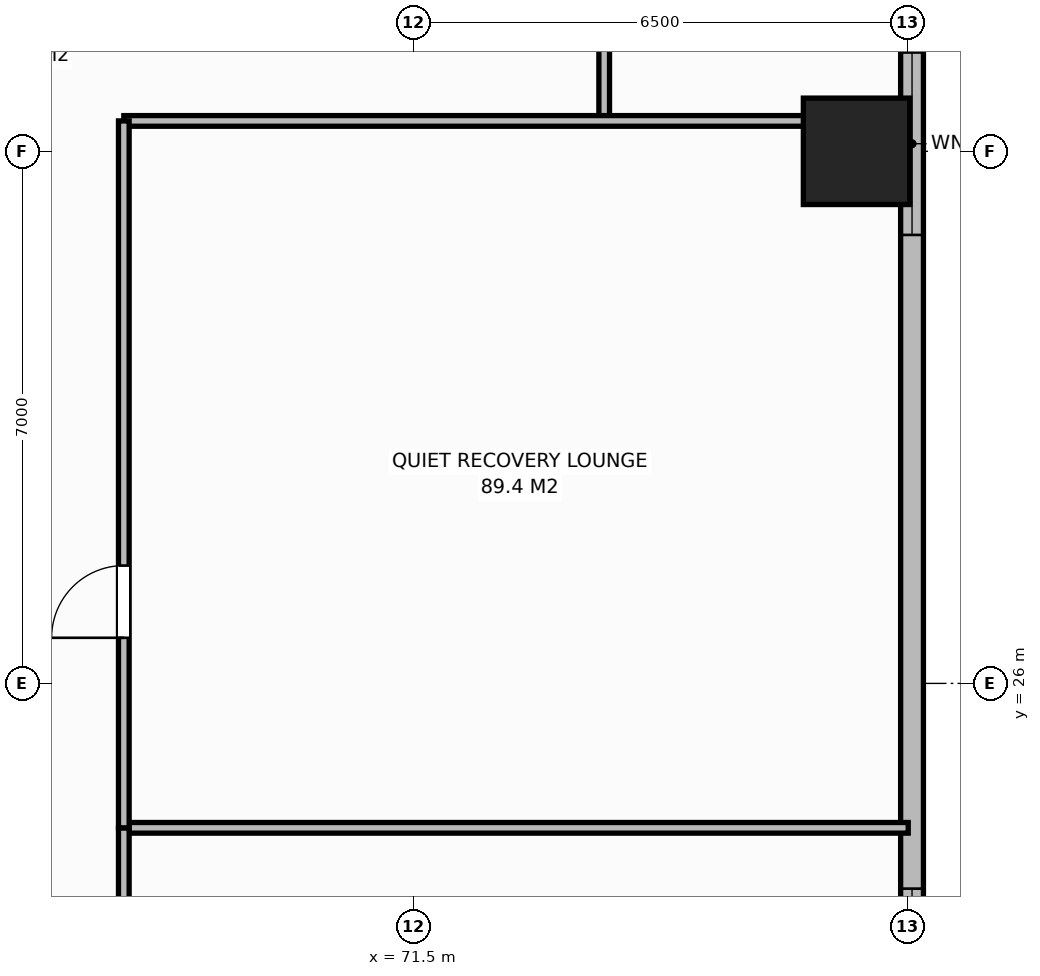
"""IFC4 building model, lengths in metres.
Left out: names, types, materials, properties, quantities, classifications, styles, units other than length and angle.
Written with IfcOpenShell. Run it as: python <this file> out.ifc"""

import sys

from ifc_helpers import new_model, si_unit, direction, frame, frame_2d, origin, origin_2d, place, context, subcontext, project, spatial, rectangle, extrude, element, fill, save


model = new_model("IFC4")
c1 = context("Model", 3, precision=1e-05, world=origin(), true_north=direction((0.0, 1.0)))
c2 = subcontext(c1, "Body", "Model", "MODEL_VIEW")
j1 = project(units=[si_unit("LENGTHUNIT", "METRE"), si_unit("PLANEANGLEUNIT", "RADIAN")], contexts=[c1])
p1 = place(None, origin())
s1 = spatial("IfcSite", under=j1, at=p1, CompositionType="ELEMENT")
p2 = place(p1, origin())
s2 = spatial("IfcBuilding", under=s1, at=p2, CompositionType="ELEMENT")
p3 = place(p2, frame((0.0, 0.0, 17.0)))
s3 = spatial("IfcBuildingStorey", under=s2, at=p3, CompositionType="ELEMENT", Elevation=17.0)
p4 = place(p3, frame((77.32, 33.0, 0.0), z_axis=(0.0, 0.0, 1.0), x_axis=(1.0, 0.0, 0.0)))
e1 = element("IfcColumn", 1, at=p4, inside=s3, PredefinedType="COLUMN", context=c2, shape_type="SweptSolid", body=[
    extrude(rectangle(XDim=1.4, YDim=1.4, at=origin_2d()), origin(), (0.0, 0.0, 1.0), 5.0),
])
p5 = place(p3, frame((78.05, 48.8, 0.0), z_axis=(0.0, 0.0, 1.0), x_axis=(0.0, -1.0, 0.0)))
e2 = element("IfcWall", 2, at=p5, inside=s3, PredefinedType="STANDARD", context=c2, shape_type="SweptSolid", body=[
    extrude(rectangle(XDim=45.6, YDim=0.3, at=frame_2d((22.8, 0.0))), origin(), (0.0, 0.0, 1.0), 4.4),
])
p6 = place(p5, frame((5.0, 0.0, 0.9)))
e3 = element("IfcOpeningElement", 3, at=p6, cuts=e2, PredefinedType="OPENING", context=c2, shape_type="SweptSolid", body=[
    extrude(rectangle(XDim=2.4, YDim=2.2, at=frame_2d((1.2, 1.1))), frame((0.0, 0.16, 0.0), z_axis=(0.0, -1.0, 0.0), x_axis=(1.0, 0.0, 0.0)), (0.0, 0.0, 1.0), 0.32),
])
p7 = place(p5, frame((14.5, 0.0, 0.9)))
e4 = element("IfcOpeningElement", 4, at=p7, cuts=e2, PredefinedType="OPENING", context=c2, shape_type="SweptSolid", body=[
    extrude(rectangle(XDim=2.4, YDim=2.2, at=frame_2d((1.2, 1.1))), frame((0.0, 0.16, 0.0), z_axis=(0.0, -1.0, 0.0), x_axis=(1.0, 0.0, 0.0)), (0.0, 0.0, 1.0), 0.32),
])
p8 = place(p5, frame((25.5, 0.0, 0.9)))
e5 = element("IfcOpeningElement", 5, at=p8, cuts=e2, PredefinedType="OPENING", context=c2, shape_type="SweptSolid", body=[
    extrude(rectangle(XDim=2.4, YDim=2.2, at=frame_2d((1.2, 1.1))), frame((0.0, 0.16, 0.0), z_axis=(0.0, -1.0, 0.0), x_axis=(1.0, 0.0, 0.0)), (0.0, 0.0, 1.0), 0.32),
])
p9 = place(p5, frame((35.0, 0.0, 0.9)))
e6 = element("IfcOpeningElement", 6, at=p9, cuts=e2, PredefinedType="OPENING", context=c2, shape_type="SweptSolid", body=[
    extrude(rectangle(XDim=2.4, YDim=2.2, at=frame_2d((1.2, 1.1))), frame((0.0, 0.16, 0.0), z_axis=(0.0, -1.0, 0.0), x_axis=(1.0, 0.0, 0.0)), (0.0, 0.0, 1.0), 0.32),
])
p10 = place(p3, frame((67.68, 24.1, 0.0), z_axis=(0.0, 0.0, 1.0), x_axis=(1.0, 0.0, 0.0)))
e7 = element("IfcWall", 7, at=p10, inside=s3, PredefinedType="PARTITIONING", context=c2, shape_type="SweptSolid", body=[
    extrude(rectangle(XDim=10.32, YDim=0.14, at=frame_2d((5.16, 0.0))), origin(), (0.0, 0.0, 1.0), 4.4),
])
p11 = place(p3, frame((74.0, 33.4, 0.0), z_axis=(0.0, 0.0, 1.0), x_axis=(0.0, 1.0, 0.0)))
e8 = element("IfcWall", 8, at=p11, inside=s3, PredefinedType="PARTITIONING", context=c2, shape_type="SweptSolid", body=[
    extrude(rectangle(XDim=2.18, YDim=0.14, at=frame_2d((1.09, 0.0))), origin(), (0.0, 0.0, 1.0), 4.4),
])
p12 = place(p3, frame((67.68, 33.4, 0.0), z_axis=(0.0, 0.0, 1.0), x_axis=(1.0, 0.0, 0.0)))
e9 = element("IfcWall", 9, at=p12, inside=s3, PredefinedType="PARTITIONING", context=c2, shape_type="SweptSolid", body=[
    extrude(rectangle(XDim=10.32, YDim=0.14, at=frame_2d((5.16, 0.0))), origin(), (0.0, 0.0, 1.0), 4.4),
])
p13 = place(p3, frame((67.68, 12.45, 0.0), z_axis=(0.0, 0.0, 1.0), x_axis=(0.0, 1.0, 0.0)))
e10 = element("IfcWall", 10, at=p13, inside=s3, PredefinedType="PARTITIONING", context=c2, shape_type="SweptSolid", body=[
    extrude(rectangle(XDim=11.65, YDim=0.14, at=frame_2d((5.825, 0.0))), origin(), (0.0, 0.0, 1.0), 4.4),
])
p14 = place(p13, frame((3.0, 0.0, 0.0)))
e11 = element("IfcOpeningElement", 11, at=p14, cuts=e10, PredefinedType="OPENING", context=c2, shape_type="SweptSolid", body=[
    extrude(rectangle(XDim=1.1, YDim=2.15, at=frame_2d((0.55, 1.075))), frame((0.0, 0.08, 0.0), z_axis=(0.0, -1.0, 0.0), x_axis=(1.0, 0.0, 0.0)), (0.0, 0.0, 1.0), 0.16),
])
p15 = place(p3, frame((67.68, 24.1, 0.0), z_axis=(0.0, 0.0, 1.0), x_axis=(0.0, 1.0, 0.0)))
e12 = element("IfcWall", 12, at=p15, inside=s3, PredefinedType="PARTITIONING", context=c2, shape_type="SweptSolid", body=[
    extrude(rectangle(XDim=9.3, YDim=0.14, at=frame_2d((4.65, 0.0))), origin(), (0.0, 0.0, 1.0), 4.4),
])
p16 = place(p15, frame((2.5, 0.0, 0.0)))
e13 = element("IfcOpeningElement", 13, at=p16, cuts=e12, PredefinedType="OPENING", context=c2, shape_type="SweptSolid", body=[
    extrude(rectangle(XDim=0.95, YDim=2.15, at=frame_2d((0.475, 1.075))), frame((0.0, 0.08, 0.0), z_axis=(0.0, -1.0, 0.0), x_axis=(1.0, 0.0, 0.0)), (0.0, 0.0, 1.0), 0.16),
])
p17 = place(p7, origin())
e14 = element("IfcWindow", 14, at=p17, inside=s3, PartitioningType="SINGLE_PANEL", PredefinedType="WINDOW", context=c2, shape_type="SweptSolid", body=[
    extrude(rectangle(XDim=2.4, YDim=2.2, at=frame_2d((1.2, 1.1))), frame((0.0, 0.03, 0.0), z_axis=(0.0, -1.0, 0.0), x_axis=(1.0, 0.0, 0.0)), (0.0, 0.0, 1.0), 0.06),
])
fill(e4, e14)
p18 = place(p8, origin())
e15 = element("IfcWindow", 15, at=p18, inside=s3, PartitioningType="SINGLE_PANEL", PredefinedType="WINDOW", context=c2, shape_type="SweptSolid", body=[
    extrude(rectangle(XDim=2.4, YDim=2.2, at=frame_2d((1.2, 1.1))), frame((0.0, 0.03, 0.0), z_axis=(0.0, -1.0, 0.0), x_axis=(1.0, 0.0, 0.0)), (0.0, 0.0, 1.0), 0.06),
])
fill(e5, e15)
p19 = place(p16, origin())
e16 = element("IfcDoor", 16, at=p19, inside=s3, OperationType="SINGLE_SWING_LEFT", PredefinedType="DOOR", context=c2, shape_type="SweptSolid", body=[
    extrude(rectangle(XDim=0.95, YDim=2.15, at=frame_2d((0.475, 1.075))), frame((0.0, 0.025, 0.0), z_axis=(0.0, -1.0, 0.0), x_axis=(1.0, 0.0, 0.0)), (0.0, 0.0, 1.0), 0.05),
])
fill(e13, e16)
save(model, sys.argv[1])
